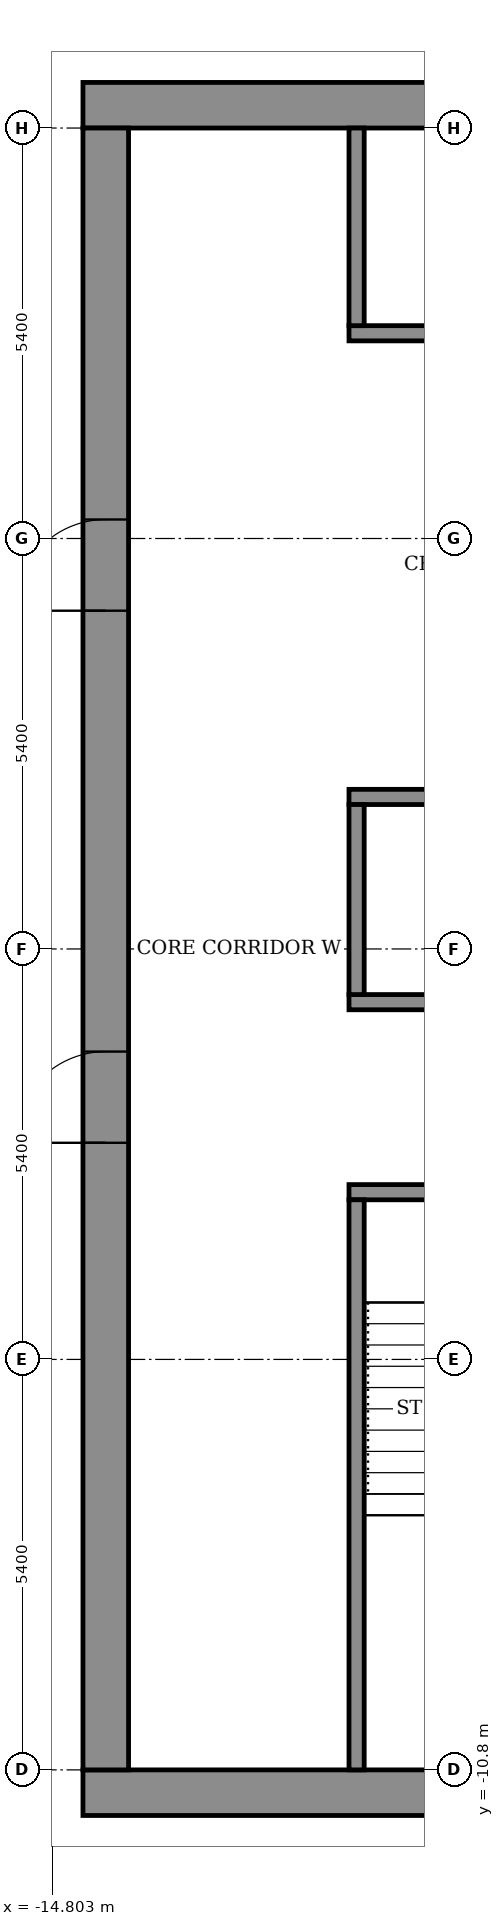
"""IFC4 building model, lengths in metres.
Left out: names, types, materials, properties, quantities, classifications, styles, units other than length and angle.
Written with IfcOpenShell. Run it as: python <this file> out.ifc"""

import sys

from ifc_helpers import new_model, si_unit, direction, frame, frame_2d, origin, place, context, subcontext, project, spatial, rectangle, extrude, element, fill, save


model = new_model("IFC4")
c1 = context("Model", 3, precision=1e-05, world=origin(), true_north=direction((0.0, 1.0)))
c2 = subcontext(c1, "Body", "Model", "MODEL_VIEW")
j1 = project(units=[si_unit("LENGTHUNIT", "METRE"), si_unit("PLANEANGLEUNIT", "RADIAN")], contexts=[c1])
p1 = place(None, origin())
s1 = spatial("IfcSite", under=j1, at=p1, CompositionType="ELEMENT")
p2 = place(p1, origin())
s2 = spatial("IfcBuilding", under=s1, at=p2, CompositionType="ELEMENT")
p3 = place(p2, frame((0.0, 0.0, 334.3)))
s3 = spatial("IfcBuildingStorey", under=s2, at=p3, CompositionType="ELEMENT", Elevation=334.3)
for number, where, z_axis, x_axis in (
    (1, (-14.4, -11.1, 0.0), (0.0, 0.0, 1.0), (1.0, 0.0, 0.0)),
    (2, (-14.4, 11.1, 0.0), (0.0, 0.0, 1.0), (1.0, 0.0, 0.0)),
):
    element("IfcWall", number, at=place(p3, frame(where, z_axis=z_axis, x_axis=x_axis)), inside=s3, PredefinedType="SHEAR", context=c2, shape_type="SweptSolid", body=[
        extrude(rectangle(XDim=28.8, YDim=0.6, at=frame_2d((14.4, 0.0))), origin(), (0.0, 0.0, 1.0), 3.6),
    ])
p4 = place(p3, frame((-14.1, -10.8, 0.0), z_axis=(0.0, 0.0, 1.0), x_axis=(0.0, 1.0, 0.0)))
e3 = element("IfcWall", 3, at=p4, inside=s3, PredefinedType="SHEAR", context=c2, shape_type="SweptSolid", body=[
    extrude(rectangle(XDim=21.6, YDim=0.6, at=frame_2d((10.8, 0.0))), origin(), (0.0, 0.0, 1.0), 3.6),
])
p5 = place(p4, frame((8.25, 0.0, 0.0)))
e4 = element("IfcOpeningElement", 4, at=p5, cuts=e3, PredefinedType="OPENING", context=c2, shape_type="SweptSolid", body=[
    extrude(rectangle(XDim=1.2, YDim=2.1, at=frame_2d((0.6, 1.05))), frame((0.0, 0.31, 0.0), z_axis=(0.0, -1.0, 0.0), x_axis=(1.0, 0.0, 0.0)), (0.0, 0.0, 1.0), 0.62),
])
p6 = place(p4, frame((15.25, 0.0, 0.0)))
e5 = element("IfcOpeningElement", 5, at=p6, cuts=e3, PredefinedType="OPENING", context=c2, shape_type="SweptSolid", body=[
    extrude(rectangle(XDim=1.2, YDim=2.1, at=frame_2d((0.6, 1.05))), frame((0.0, 0.31, 0.0), z_axis=(0.0, -1.0, 0.0), x_axis=(1.0, 0.0, 0.0)), (0.0, 0.0, 1.0), 0.62),
])
p7 = place(p3, frame((-10.9, -3.2, 0.0), z_axis=(0.0, 0.0, 1.0), x_axis=(1.0, 0.0, 0.0)))
e6 = element("IfcWall", 6, at=p7, inside=s3, PredefinedType="SHEAR", context=c2, shape_type="SweptSolid", body=[
    extrude(rectangle(XDim=21.8, YDim=0.2, at=frame_2d((10.9, 0.0))), origin(), (0.0, 0.0, 1.0), 3.05),
])
p8 = place(p7, frame((1.075, 0.0, 0.0)))
e7 = element("IfcOpeningElement", 7, at=p8, cuts=e6, PredefinedType="OPENING", context=c2, shape_type="SweptSolid", body=[
    extrude(rectangle(XDim=1.1, YDim=2.1, at=frame_2d((0.55, 1.05))), frame((0.0, 0.11, 0.0), z_axis=(0.0, -1.0, 0.0), x_axis=(1.0, 0.0, 0.0)), (0.0, 0.0, 1.0), 0.22),
])
p9 = place(p7, frame((10.325, 0.0, 0.0)))
e8 = element("IfcOpeningElement", 8, at=p9, cuts=e6, PredefinedType="OPENING", context=c2, shape_type="SweptSolid", body=[
    extrude(rectangle(XDim=1.1, YDim=2.1, at=frame_2d((0.55, 1.05))), frame((0.0, 0.11, 0.0), z_axis=(0.0, -1.0, 0.0), x_axis=(1.0, 0.0, 0.0)), (0.0, 0.0, 1.0), 0.22),
])
p10 = place(p7, frame((19.625, 0.0, 0.0)))
e9 = element("IfcOpeningElement", 9, at=p10, cuts=e6, PredefinedType="OPENING", context=c2, shape_type="SweptSolid", body=[
    extrude(rectangle(XDim=1.1, YDim=2.1, at=frame_2d((0.55, 1.05))), frame((0.0, 0.11, 0.0), z_axis=(0.0, -1.0, 0.0), x_axis=(1.0, 0.0, 0.0)), (0.0, 0.0, 1.0), 0.22),
])
p11 = place(p7, frame((5.7, 0.0, 0.0)))
e10 = element("IfcOpeningElement", 10, at=p11, cuts=e6, PredefinedType="OPENING", context=c2, shape_type="SweptSolid", body=[
    extrude(rectangle(XDim=1.1, YDim=2.1, at=frame_2d((0.55, 1.05))), frame((0.0, 0.11, 0.0), z_axis=(0.0, -1.0, 0.0), x_axis=(1.0, 0.0, 0.0)), (0.0, 0.0, 1.0), 0.22),
])
p12 = place(p7, frame((14.975, 0.0, 0.0)))
e11 = element("IfcOpeningElement", 11, at=p12, cuts=e6, PredefinedType="OPENING", context=c2, shape_type="SweptSolid", body=[
    extrude(rectangle(XDim=1.1, YDim=2.1, at=frame_2d((0.55, 1.05))), frame((0.0, 0.11, 0.0), z_axis=(0.0, -1.0, 0.0), x_axis=(1.0, 0.0, 0.0)), (0.0, 0.0, 1.0), 0.22),
])
p13 = place(p3, frame((-10.9, -0.7, 0.0), z_axis=(0.0, 0.0, 1.0), x_axis=(1.0, 0.0, 0.0)))
e12 = element("IfcWall", 12, at=p13, inside=s3, PredefinedType="SHEAR", context=c2, shape_type="SweptSolid", body=[
    extrude(rectangle(XDim=21.8, YDim=0.2, at=frame_2d((10.9, 0.0))), origin(), (0.0, 0.0, 1.0), 3.05),
])
p14 = place(p3, frame((-10.9, 2.0, 0.0), z_axis=(0.0, 0.0, 1.0), x_axis=(1.0, 0.0, 0.0)))
e13 = element("IfcWall", 13, at=p14, inside=s3, PredefinedType="SHEAR", context=c2, shape_type="SweptSolid", body=[
    extrude(rectangle(XDim=21.8, YDim=0.2, at=frame_2d((10.9, 0.0))), origin(), (0.0, 0.0, 1.0), 3.05),
])
p15 = place(p14, frame((4.95, 0.0, 0.0)))
e14 = element("IfcOpeningElement", 14, at=p15, cuts=e13, PredefinedType="OPENING", context=c2, shape_type="SweptSolid", body=[
    extrude(rectangle(XDim=1.1, YDim=2.1, at=frame_2d((0.55, 1.05))), frame((0.0, 0.11, 0.0), z_axis=(0.0, -1.0, 0.0), x_axis=(1.0, 0.0, 0.0)), (0.0, 0.0, 1.0), 0.22),
])
p16 = place(p14, frame((7.65, 0.0, 0.0)))
e15 = element("IfcOpeningElement", 15, at=p16, cuts=e13, PredefinedType="OPENING", context=c2, shape_type="SweptSolid", body=[
    extrude(rectangle(XDim=1.1, YDim=2.1, at=frame_2d((0.55, 1.05))), frame((0.0, 0.11, 0.0), z_axis=(0.0, -1.0, 0.0), x_axis=(1.0, 0.0, 0.0)), (0.0, 0.0, 1.0), 0.22),
])
p17 = place(p14, frame((10.35, 0.0, 0.0)))
e16 = element("IfcOpeningElement", 16, at=p17, cuts=e13, PredefinedType="OPENING", context=c2, shape_type="SweptSolid", body=[
    extrude(rectangle(XDim=1.1, YDim=2.1, at=frame_2d((0.55, 1.05))), frame((0.0, 0.11, 0.0), z_axis=(0.0, -1.0, 0.0), x_axis=(1.0, 0.0, 0.0)), (0.0, 0.0, 1.0), 0.22),
])
p18 = place(p14, frame((1.675, 0.0, 0.0)))
e17 = element("IfcOpeningElement", 17, at=p18, cuts=e13, PredefinedType="OPENING", context=c2, shape_type="SweptSolid", body=[
    extrude(rectangle(XDim=0.9, YDim=2.1, at=frame_2d((0.45, 1.05))), frame((0.0, 0.11, 0.0), z_axis=(0.0, -1.0, 0.0), x_axis=(1.0, 0.0, 0.0)), (0.0, 0.0, 1.0), 0.22),
])
p19 = place(p14, frame((14.5, 0.0, 0.0)))
e18 = element("IfcOpeningElement", 18, at=p19, cuts=e13, PredefinedType="OPENING", context=c2, shape_type="SweptSolid", body=[
    extrude(rectangle(XDim=0.9, YDim=2.1, at=frame_2d((0.45, 1.05))), frame((0.0, 0.11, 0.0), z_axis=(0.0, -1.0, 0.0), x_axis=(1.0, 0.0, 0.0)), (0.0, 0.0, 1.0), 0.22),
])
p20 = place(p14, frame((19.225, 0.0, 0.0)))
e19 = element("IfcOpeningElement", 19, at=p20, cuts=e13, PredefinedType="OPENING", context=c2, shape_type="SweptSolid", body=[
    extrude(rectangle(XDim=0.9, YDim=2.1, at=frame_2d((0.45, 1.05))), frame((0.0, 0.11, 0.0), z_axis=(0.0, -1.0, 0.0), x_axis=(1.0, 0.0, 0.0)), (0.0, 0.0, 1.0), 0.22),
])
p21 = place(p3, frame((-10.9, 8.1, 0.0), z_axis=(0.0, 0.0, 1.0), x_axis=(1.0, 0.0, 0.0)))
e20 = element("IfcWall", 20, at=p21, inside=s3, PredefinedType="SHEAR", context=c2, shape_type="SweptSolid", body=[
    extrude(rectangle(XDim=21.8, YDim=0.2, at=frame_2d((10.9, 0.0))), origin(), (0.0, 0.0, 1.0), 3.05),
])
p22 = place(p21, frame((4.95, 0.0, 0.0)))
e21 = element("IfcOpeningElement", 21, at=p22, cuts=e20, PredefinedType="OPENING", context=c2, shape_type="SweptSolid", body=[
    extrude(rectangle(XDim=1.1, YDim=2.1, at=frame_2d((0.55, 1.05))), frame((0.0, 0.11, 0.0), z_axis=(0.0, -1.0, 0.0), x_axis=(1.0, 0.0, 0.0)), (0.0, 0.0, 1.0), 0.22),
])
p23 = place(p21, frame((7.65, 0.0, 0.0)))
e22 = element("IfcOpeningElement", 22, at=p23, cuts=e20, PredefinedType="OPENING", context=c2, shape_type="SweptSolid", body=[
    extrude(rectangle(XDim=1.1, YDim=2.1, at=frame_2d((0.55, 1.05))), frame((0.0, 0.11, 0.0), z_axis=(0.0, -1.0, 0.0), x_axis=(1.0, 0.0, 0.0)), (0.0, 0.0, 1.0), 0.22),
])
p24 = place(p21, frame((10.35, 0.0, 0.0)))
e23 = element("IfcOpeningElement", 23, at=p24, cuts=e20, PredefinedType="OPENING", context=c2, shape_type="SweptSolid", body=[
    extrude(rectangle(XDim=1.1, YDim=2.1, at=frame_2d((0.55, 1.05))), frame((0.0, 0.11, 0.0), z_axis=(0.0, -1.0, 0.0), x_axis=(1.0, 0.0, 0.0)), (0.0, 0.0, 1.0), 0.22),
])
p25 = place(p21, frame((1.675, 0.0, 0.0)))
e24 = element("IfcOpeningElement", 24, at=p25, cuts=e20, PredefinedType="OPENING", context=c2, shape_type="SweptSolid", body=[
    extrude(rectangle(XDim=0.9, YDim=2.1, at=frame_2d((0.45, 1.05))), frame((0.0, 0.11, 0.0), z_axis=(0.0, -1.0, 0.0), x_axis=(1.0, 0.0, 0.0)), (0.0, 0.0, 1.0), 0.22),
])
p26 = place(p21, frame((14.5, 0.0, 0.0)))
e25 = element("IfcOpeningElement", 25, at=p26, cuts=e20, PredefinedType="OPENING", context=c2, shape_type="SweptSolid", body=[
    extrude(rectangle(XDim=0.9, YDim=2.1, at=frame_2d((0.45, 1.05))), frame((0.0, 0.11, 0.0), z_axis=(0.0, -1.0, 0.0), x_axis=(1.0, 0.0, 0.0)), (0.0, 0.0, 1.0), 0.22),
])
p27 = place(p21, frame((19.225, 0.0, 0.0)))
e26 = element("IfcOpeningElement", 26, at=p27, cuts=e20, PredefinedType="OPENING", context=c2, shape_type="SweptSolid", body=[
    extrude(rectangle(XDim=0.9, YDim=2.1, at=frame_2d((0.45, 1.05))), frame((0.0, 0.11, 0.0), z_axis=(0.0, -1.0, 0.0), x_axis=(1.0, 0.0, 0.0)), (0.0, 0.0, 1.0), 0.22),
])
p28 = place(p3, frame((-10.8, -10.8, 0.0), z_axis=(0.0, 0.0, 1.0), x_axis=(0.0, 1.0, 0.0)))
e27 = element("IfcWall", 27, at=p28, inside=s3, PredefinedType="SHEAR", context=c2, shape_type="SweptSolid", body=[
    extrude(rectangle(XDim=7.5, YDim=0.2, at=frame_2d((3.75, 0.0))), origin(), (0.0, 0.0, 1.0), 3.05),
])
p29 = place(p3, frame((-10.8, -0.6, 0.0), z_axis=(0.0, 0.0, 1.0), x_axis=(0.0, 1.0, 0.0)))
e28 = element("IfcWall", 28, at=p29, inside=s3, PredefinedType="STANDARD", context=c2, shape_type="SweptSolid", body=[
    extrude(rectangle(XDim=2.5, YDim=0.2, at=frame_2d((1.25, 0.0))), origin(), (0.0, 0.0, 1.0), 3.05),
])
p30 = place(p3, frame((-10.8, 8.2, 0.0), z_axis=(0.0, 0.0, 1.0), x_axis=(0.0, 1.0, 0.0)))
e29 = element("IfcWall", 29, at=p30, inside=s3, PredefinedType="STANDARD", context=c2, shape_type="SweptSolid", body=[
    extrude(rectangle(XDim=2.6, YDim=0.2, at=frame_2d((1.3, 0.0))), origin(), (0.0, 0.0, 1.0), 3.05),
])
p31 = place(p5, origin())
e30 = element("IfcDoor", 30, at=p31, inside=s3, OperationType="DOUBLE_DOOR_SINGLE_SWING", PredefinedType="DOOR", context=c2, shape_type="SweptSolid", body=[
    extrude(rectangle(XDim=1.2, YDim=2.1, at=frame_2d((0.6, 1.05))), frame((0.0, 0.025, 0.0), z_axis=(0.0, -1.0, 0.0), x_axis=(1.0, 0.0, 0.0)), (0.0, 0.0, 1.0), 0.05),
])
fill(e4, e30)
p32 = place(p6, origin())
e31 = element("IfcDoor", 31, at=p32, inside=s3, OperationType="DOUBLE_DOOR_SINGLE_SWING", PredefinedType="DOOR", context=c2, shape_type="SweptSolid", body=[
    extrude(rectangle(XDim=1.2, YDim=2.1, at=frame_2d((0.6, 1.05))), frame((0.0, 0.025, 0.0), z_axis=(0.0, -1.0, 0.0), x_axis=(1.0, 0.0, 0.0)), (0.0, 0.0, 1.0), 0.05),
])
fill(e5, e31)
save(model, sys.argv[1])
